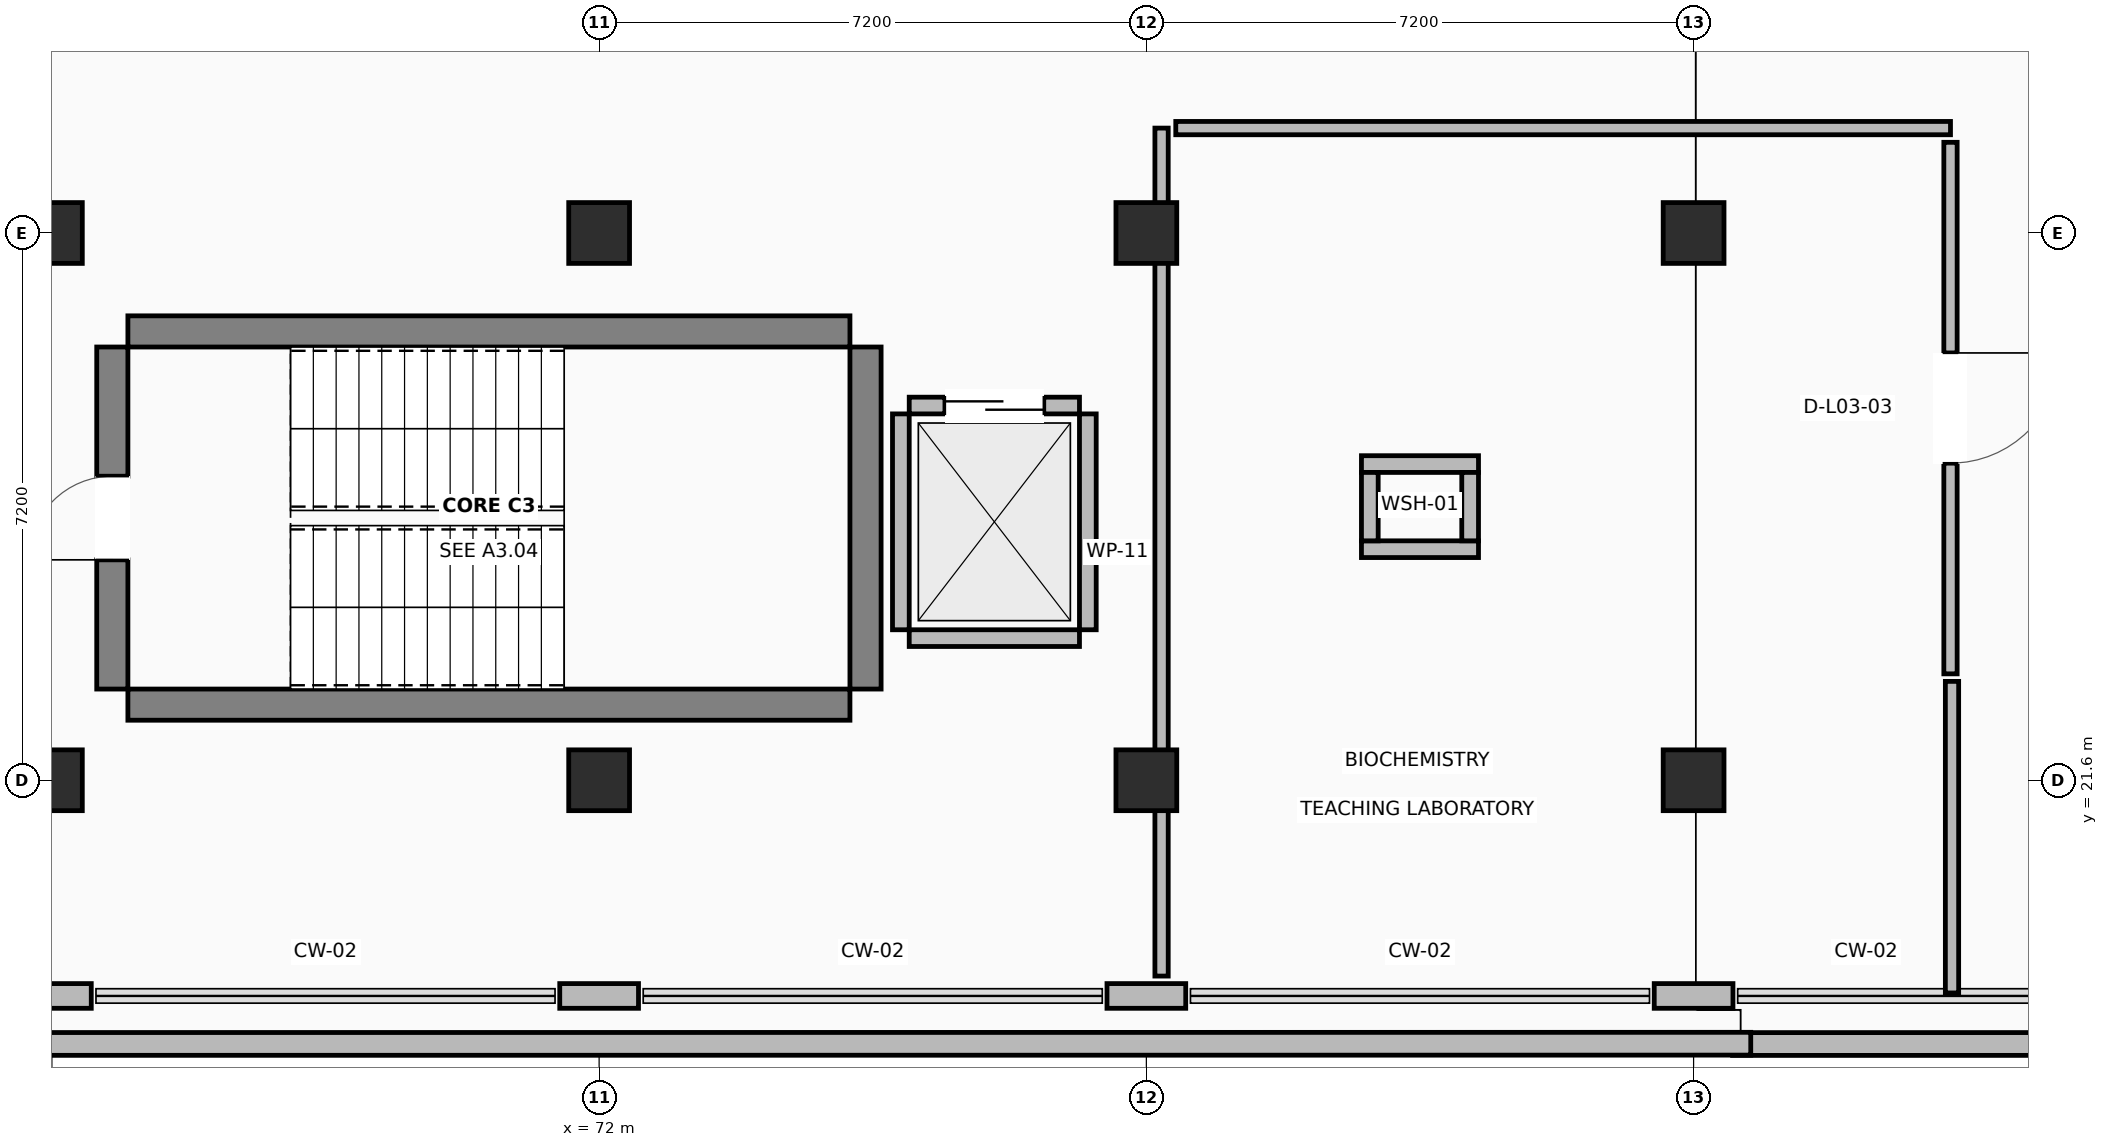
"""IFC4 building model, lengths in metres.
Left out: names, types, materials, properties, quantities, classifications, styles, units other than length and angle.
Written with IfcOpenShell. Run it as: python <this file> out.ifc"""

import sys

from ifc_helpers import new_model, si_unit, direction, frame, frame_2d, origin, origin_2d, place, context, subcontext, project, spatial, rectangle, extrude, element, fill, save


model = new_model("IFC4")
c1 = context("Model", 3, precision=1e-05, world=origin(), true_north=direction((0.0, 1.0)))
c2 = subcontext(c1, "Body", "Model", "MODEL_VIEW")
j1 = project(units=[si_unit("LENGTHUNIT", "METRE"), si_unit("PLANEANGLEUNIT", "RADIAN")], contexts=[c1])
p1 = place(None, origin())
s1 = spatial("IfcSite", under=j1, at=p1, CompositionType="ELEMENT")
p2 = place(p1, origin())
s2 = spatial("IfcBuilding", under=s1, at=p2, CompositionType="ELEMENT")
p3 = place(p2, frame((0.0, 0.0, 13.5)))
s3 = spatial("IfcBuildingStorey", under=s2, at=p3, CompositionType="ELEMENT", Elevation=13.5)
for number, where, z_axis, x_axis in (
    (1, (64.8, 21.6, 0.0), (0.0, 0.0, 1.0), (1.0, 0.0, 0.0)),
    (2, (64.8, 28.8, 0.0), (0.0, 0.0, 1.0), (1.0, 0.0, 0.0)),
    (3, (72.0, 21.6, 0.0), (0.0, 0.0, 1.0), (1.0, 0.0, 0.0)),
    (4, (72.0, 28.8, 0.0), (0.0, 0.0, 1.0), (1.0, 0.0, 0.0)),
    (5, (79.2, 21.6, 0.0), (0.0, 0.0, 1.0), (1.0, 0.0, 0.0)),
    (6, (79.2, 28.8, 0.0), (0.0, 0.0, 1.0), (1.0, 0.0, 0.0)),
    (7, (86.4, 21.6, 0.0), (0.0, 0.0, 1.0), (1.0, 0.0, 0.0)),
    (8, (86.4, 28.8, 0.0), (0.0, 0.0, 1.0), (1.0, 0.0, 0.0)),
):
    element("IfcColumn", number, at=place(p3, frame(where, z_axis=z_axis, x_axis=x_axis)), inside=s3, PredefinedType="COLUMN", context=c2, shape_type="SweptSolid", body=[
        extrude(rectangle(XDim=0.8, YDim=0.8, at=origin_2d()), origin(), (0.0, 0.0, 1.0), 4.22),
    ])
for number, where, z_axis, x_axis in (
    (9, (65.8, 22.595, 0.0), (0.0, 0.0, 1.0), (1.0, 0.0, 0.0)),
    (10, (65.8, 27.505, 0.0), (0.0, 0.0, 1.0), (1.0, 0.0, 0.0)),
):
    element("IfcWall", number, at=place(p3, frame(where, z_axis=z_axis, x_axis=x_axis)), inside=s3, PredefinedType="SHEAR", context=c2, shape_type="SweptSolid", body=[
        extrude(rectangle(XDim=9.5, YDim=0.41, at=frame_2d((4.75, 0.0))), origin(), (0.0, 0.0, 1.0), 4.22),
    ])
p4 = place(p3, frame((65.595, 22.8, 0.0), z_axis=(0.0, 0.0, 1.0), x_axis=(0.0, 1.0, 0.0)))
e11 = element("IfcWall", 11, at=p4, inside=s3, PredefinedType="SHEAR", context=c2, shape_type="SweptSolid", body=[
    extrude(rectangle(XDim=4.5, YDim=0.41, at=frame_2d((2.25, 0.0))), origin(), (0.0, 0.0, 1.0), 4.22),
])
p5 = place(p4, frame((1.7, 0.0, 0.0)))
e12 = element("IfcOpeningElement", 12, at=p5, cuts=e11, PredefinedType="OPENING", context=c2, shape_type="SweptSolid", body=[
    extrude(rectangle(XDim=1.1, YDim=2.15, at=frame_2d((0.55, 1.075))), frame((0.0, 0.215, 0.0), z_axis=(0.0, -1.0, 0.0), x_axis=(1.0, 0.0, 0.0)), (0.0, 0.0, 1.0), 0.43),
])
p6 = place(p3, frame((75.505, 22.8, 0.0), z_axis=(0.0, 0.0, 1.0), x_axis=(0.0, 1.0, 0.0)))
e13 = element("IfcWall", 13, at=p6, inside=s3, PredefinedType="SHEAR", context=c2, shape_type="SweptSolid", body=[
    extrude(rectangle(XDim=4.5, YDim=0.41, at=frame_2d((2.25, 0.0))), origin(), (0.0, 0.0, 1.0), 4.22),
])
for number, where, z_axis, x_axis in (
    (14, (64.282, 18.762, 0.0), (0.0, 0.0, 1.0), (1.0, 0.0, 0.0)),
    (15, (71.482, 18.762, 0.0), (0.0, 0.0, 1.0), (1.0, 0.0, 0.0)),
    (16, (78.682, 18.762, 0.0), (0.0, 0.0, 1.0), (1.0, 0.0, 0.0)),
):
    element("IfcWall", number, at=place(p3, frame(where, z_axis=z_axis, x_axis=x_axis)), inside=s3, PredefinedType="STANDARD", context=c2, shape_type="SweptSolid", body=[
        extrude(rectangle(XDim=1.036, YDim=0.325, at=frame_2d((0.518, 0.0))), origin(), (0.0, 0.0, 1.0), 3.26),
    ])
p7 = place(p3, frame((85.882, 18.762, 0.0), z_axis=(0.0, 0.0, 1.0), x_axis=(1.0, 0.0, 0.0)))
e17 = element("IfcWall", 17, at=p7, inside=s3, PredefinedType="STANDARD", context=c2, shape_type="SweptSolid", body=[
    extrude(rectangle(XDim=1.036, YDim=0.325, at=frame_2d((0.518, 0.0))), origin(), (0.0, 0.0, 1.0), 3.26),
])
p8 = place(p3, frame((115.82, 18.134, 0.0), z_axis=(0.0, 0.0, 1.0), x_axis=(-0.999999989693, -0.000143577442, 0.0)))
e18 = element("IfcWall", 18, at=p8, inside=s3, PredefinedType="PARAPET", context=c2, shape_type="SweptSolid", body=[
    extrude(rectangle(XDim=28.907, YDim=0.3, at=frame_2d((14.454, 0.0))), origin(), (0.0, 0.0, 1.0), 1.18),
])
p9 = place(p3, frame((87.152, 18.134, 0.0), z_axis=(0.0, 0.0, 1.0), x_axis=(-0.999999990118, -0.00014058533, 0.0)))
e19 = element("IfcWall", 19, at=p9, inside=s3, PredefinedType="PARAPET", context=c2, shape_type="SweptSolid", body=[
    extrude(rectangle(XDim=29.522, YDim=0.3, at=frame_2d((14.761, 0.0))), origin(), (0.0, 0.0, 1.0), 1.18),
])
p10 = place(p3, frame((76.08, 23.47, 0.0), z_axis=(0.0, 0.0, 1.0), x_axis=(1.0, 0.0, 0.0)))
e20 = element("IfcWall", 20, at=p10, inside=s3, PredefinedType="STANDARD", context=c2, shape_type="SweptSolid", body=[
    extrude(rectangle(XDim=2.24, YDim=0.22, at=frame_2d((1.12, 0.0))), origin(), (0.0, 0.0, 1.0), 3.26),
])
p11 = place(p3, frame((76.08, 26.53, 0.0), z_axis=(0.0, 0.0, 1.0), x_axis=(1.0, 0.0, 0.0)))
e21 = element("IfcWall", 21, at=p11, inside=s3, PredefinedType="STANDARD", context=c2, shape_type="SweptSolid", body=[
    extrude(rectangle(XDim=2.24, YDim=0.22, at=frame_2d((1.12, 0.0))), origin(), (0.0, 0.0, 1.0), 3.26),
])
p12 = place(p11, frame((0.47, 0.0, 0.0)))
e22 = element("IfcOpeningElement", 22, at=p12, cuts=e21, PredefinedType="OPENING", context=c2, shape_type="SweptSolid", body=[
    extrude(rectangle(XDim=1.3, YDim=2.2, at=frame_2d((0.65, 1.1))), frame((0.0, 0.12, 0.0), z_axis=(0.0, -1.0, 0.0), x_axis=(1.0, 0.0, 0.0)), (0.0, 0.0, 1.0), 0.24),
])
for number, where, z_axis, x_axis in (
    (23, (75.97, 23.58, 0.0), (0.0, 0.0, 1.0), (0.0, 1.0, 0.0)),
    (24, (78.43, 23.58, 0.0), (0.0, 0.0, 1.0), (0.0, 1.0, 0.0)),
):
    element("IfcWall", number, at=place(p3, frame(where, z_axis=z_axis, x_axis=x_axis)), inside=s3, PredefinedType="STANDARD", context=c2, shape_type="SweptSolid", body=[
        extrude(rectangle(XDim=2.84, YDim=0.22, at=frame_2d((1.42, 0.0))), origin(), (0.0, 0.0, 1.0), 3.26),
    ])
for number, where, z_axis, x_axis in (
    (25, (82.03, 24.64, 0.0), (0.0, 0.0, 1.0), (1.0, 0.0, 0.0)),
    (26, (82.03, 25.76, 0.0), (0.0, 0.0, 1.0), (1.0, 0.0, 0.0)),
):
    element("IfcWall", number, at=place(p3, frame(where, z_axis=z_axis, x_axis=x_axis)), inside=s3, PredefinedType="STANDARD", context=c2, shape_type="SweptSolid", body=[
        extrude(rectangle(XDim=1.54, YDim=0.22, at=frame_2d((0.77, 0.0))), origin(), (0.0, 0.0, 1.0), 3.26),
    ])
for number, where, z_axis, x_axis in (
    (27, (82.14, 24.75, 0.0), (0.0, 0.0, 1.0), (0.0, 1.0, 0.0)),
    (28, (83.46, 24.75, 0.0), (0.0, 0.0, 1.0), (0.0, 1.0, 0.0)),
):
    element("IfcWall", number, at=place(p3, frame(where, z_axis=z_axis, x_axis=x_axis)), inside=s3, PredefinedType="STANDARD", context=c2, shape_type="SweptSolid", body=[
        extrude(rectangle(XDim=0.9, YDim=0.22, at=frame_2d((0.45, 0.0))), origin(), (0.0, 0.0, 1.0), 3.26),
    ])
p13 = place(p3, frame((79.4, 19.024, 0.0), z_axis=(0.0, 0.0, 1.0), x_axis=(0.0, 1.0, 0.0)))
e29 = element("IfcWall", 29, at=p13, inside=s3, PredefinedType="PARTITIONING", context=c2, shape_type="SweptSolid", body=[
    extrude(rectangle(XDim=11.156, YDim=0.175, at=frame_2d((5.578, 0.0))), origin(), (0.0, 0.0, 1.0), 3.26),
])
p14 = place(p3, frame((79.587, 30.18, 0.0), z_axis=(0.0, 0.0, 1.0), x_axis=(1.0, 0.0, 0.0)))
e30 = element("IfcWall", 30, at=p14, inside=s3, PredefinedType="PARTITIONING", context=c2, shape_type="SweptSolid", body=[
    extrude(rectangle(XDim=10.193, YDim=0.175, at=frame_2d((5.097, 0.0))), origin(), (0.0, 0.0, 1.0), 3.26),
])
p15 = place(p3, frame((89.78, 29.993, 0.0), z_axis=(0.0, 0.0, 1.0), x_axis=(0.0, -1.0, 0.0)))
e31 = element("IfcWall", 31, at=p15, inside=s3, PredefinedType="PARTITIONING", context=c2, shape_type="SweptSolid", body=[
    extrude(rectangle(XDim=6.993, YDim=0.175, at=frame_2d((3.497, 0.0))), origin(), (0.0, 0.0, 1.0), 3.26),
])
p16 = place(p15, frame((2.771, 0.0, 0.0)))
e32 = element("IfcOpeningElement", 32, at=p16, cuts=e31, PredefinedType="OPENING", context=c2, shape_type="SweptSolid", body=[
    extrude(rectangle(XDim=1.45, YDim=2.2, at=frame_2d((0.725, 1.1))), frame((0.0, 0.097, 0.0), z_axis=(0.0, -1.0, 0.0), x_axis=(1.0, 0.0, 0.0)), (0.0, 0.0, 1.0), 0.195),
])
p17 = place(p3, frame((89.8, 22.901, 0.0), z_axis=(0.0, 0.0, 1.0), x_axis=(0.0, -1.0, 0.0)))
e33 = element("IfcWall", 33, at=p17, inside=s3, PredefinedType="PARTITIONING", context=c2, shape_type="SweptSolid", body=[
    extrude(rectangle(XDim=4.099, YDim=0.175, at=frame_2d((2.049, 0.0))), origin(), (0.0, 0.0, 1.0), 3.26),
])
p18 = place(p5, origin())
e34 = element("IfcDoor", 34, at=p18, inside=s3, OperationType="SINGLE_SWING_LEFT", PredefinedType="DOOR", context=c2, shape_type="SweptSolid", body=[
    extrude(rectangle(XDim=1.1, YDim=2.15, at=frame_2d((0.55, 1.075))), frame((0.0, 0.025, 0.0), z_axis=(0.0, -1.0, 0.0), x_axis=(1.0, 0.0, 0.0)), (0.0, 0.0, 1.0), 0.05),
])
fill(e12, e34)
p19 = place(p12, origin())
e35 = element("IfcDoor", 35, at=p19, inside=s3, OperationType="SLIDING_TO_LEFT", PredefinedType="DOOR", context=c2, shape_type="SweptSolid", body=[
    extrude(rectangle(XDim=1.3, YDim=2.2, at=frame_2d((0.65, 1.1))), frame((0.0, 0.025, 0.0), z_axis=(0.0, -1.0, 0.0), x_axis=(1.0, 0.0, 0.0)), (0.0, 0.0, 1.0), 0.05),
])
fill(e22, e35)
p20 = place(p16, origin())
e36 = element("IfcDoor", 36, at=p20, inside=s3, OperationType="SINGLE_SWING_LEFT", PredefinedType="DOOR", context=c2, shape_type="SweptSolid", body=[
    extrude(rectangle(XDim=1.45, YDim=2.2, at=frame_2d((0.725, 1.1))), frame((0.0, 0.025, 0.0), z_axis=(0.0, -1.0, 0.0), x_axis=(1.0, 0.0, 0.0)), (0.0, 0.0, 1.0), 0.05),
])
fill(e32, e36)
save(model, sys.argv[1])
